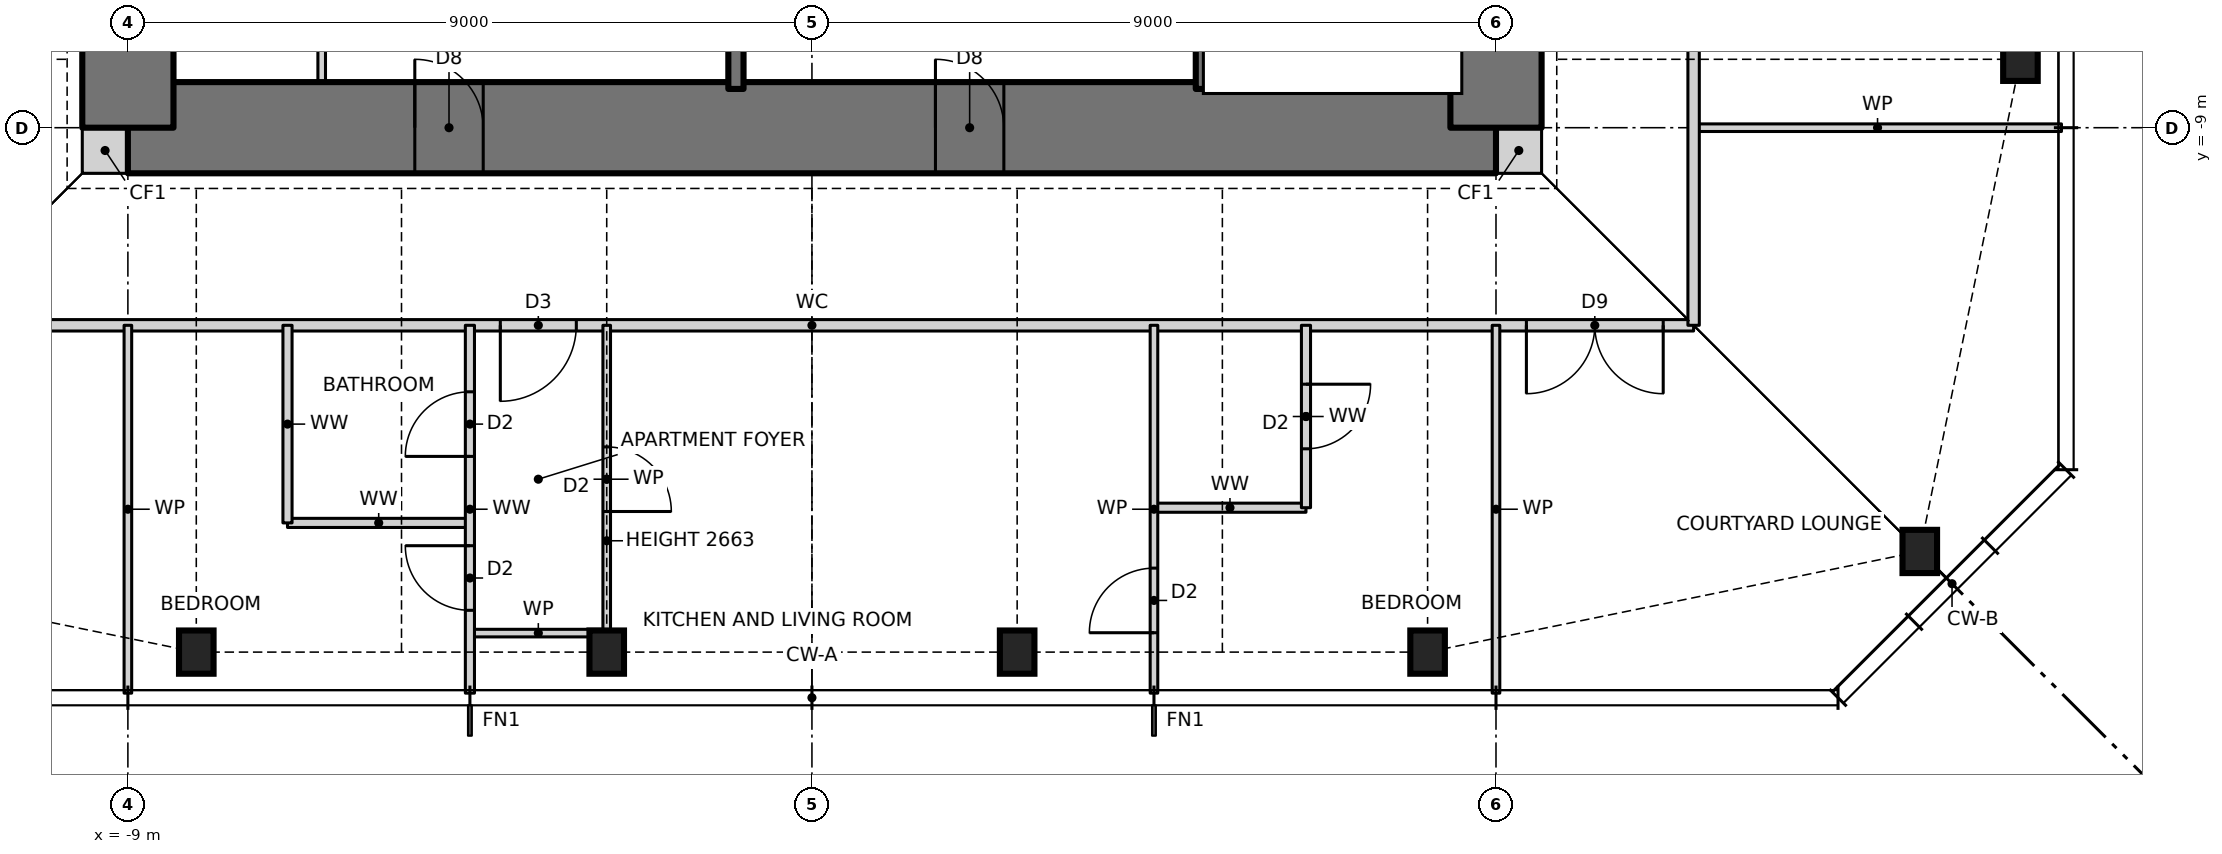
"""IFC4 building model, lengths in metres.
Left out: names, types, materials, properties, quantities, classifications, styles, units other than length and angle.
Written with IfcOpenShell. Run it as: python <this file> out.ifc"""

import sys

from ifc_helpers import new_model, si_unit, direction, frame, frame_2d, origin, origin_2d, place, context, subcontext, project, spatial, rectangle, i_section, extrude, element, fill, save


model = new_model("IFC4")
c1 = context("Model", 3, precision=1e-05, world=origin(), true_north=direction((0.0, 1.0)))
c2 = subcontext(c1, "Body", "Model", "MODEL_VIEW")
j1 = project(units=[si_unit("LENGTHUNIT", "METRE"), si_unit("PLANEANGLEUNIT", "RADIAN")], contexts=[c1])
p1 = place(None, origin())
s1 = spatial("IfcSite", under=j1, at=p1, CompositionType="ELEMENT")
p2 = place(p1, origin())
s2 = spatial("IfcBuilding", under=s1, at=p2, CompositionType="ELEMENT")
p3 = place(p2, frame((0.0, 0.0, 246.5)))
s3 = spatial("IfcBuildingStorey", under=s2, at=p3, CompositionType="ELEMENT", Elevation=246.5)
for number, where, z_axis, x_axis in (
    (1, (-8.1, -15.9, 0.0), (0.0, 0.0, 1.0), (1.0, 0.0, 0.0)),
    (2, (-2.7, -15.9, 0.0), (0.0, 0.0, 1.0), (1.0, 0.0, 0.0)),
    (3, (2.7, -15.9, 0.0), (0.0, 0.0, 1.0), (1.0, 0.0, 0.0)),
    (4, (8.1, -15.9, 0.0), (0.0, 0.0, 1.0), (1.0, 0.0, 0.0)),
    (5, (14.576, -14.576, 0.0), (0.0, 0.0, 1.0), (1.0, 0.0, 0.0)),
    (6, (15.9, -8.1, 0.0), (0.0, 0.0, 1.0), (1.0, 0.0, 0.0)),
):
    element("IfcColumn", number, at=place(p3, frame(where, z_axis=z_axis, x_axis=x_axis)), inside=s3, PredefinedType="COLUMN", context=c2, shape_type="SweptSolid", body=[
        extrude(i_section(OverallWidth=0.455, OverallDepth=0.569, WebThickness=0.078, FlangeThickness=0.125, at=origin_2d()), origin(), (0.0, 0.0, 1.0), 3.5),
    ])
for number, where, z_axis, x_axis in (
    (7, (-9.6, -9.3, 0.0), (0.0, 0.0, 1.0), (1.0, 0.0, 0.0)),
    (8, (9.0, -9.3, 0.0), (0.0, 0.0, 1.0), (1.0, 0.0, 0.0)),
):
    element("IfcWall", number, at=place(p3, frame(where, z_axis=z_axis, x_axis=x_axis)), inside=s3, PredefinedType="SOLIDWALL", context=c2, shape_type="SweptSolid", body=[
        extrude(rectangle(XDim=0.6, YDim=0.6, at=frame_2d((0.3, 0.0))), origin(), (0.0, 0.0, 1.0), 3.5),
    ])
p4 = place(p3, frame((-9.0, -9.0, 0.0), z_axis=(0.0, 0.0, 1.0), x_axis=(1.0, 0.0, 0.0)))
e9 = element("IfcWall", 9, at=p4, inside=s3, PredefinedType="SHEAR", context=c2, shape_type="SweptSolid", body=[
    extrude(rectangle(XDim=18.0, YDim=1.2, at=frame_2d((9.0, 0.0))), origin(), (0.0, 0.0, 1.0), 3.5),
])
p5 = place(p4, frame((3.775, 0.0, 0.0)))
e10 = element("IfcOpeningElement", 10, at=p5, cuts=e9, PredefinedType="OPENING", context=c2, shape_type="SweptSolid", body=[
    extrude(rectangle(XDim=0.9, YDim=2.1, at=frame_2d((0.45, 1.05))), frame((0.0, 0.61, 0.0), z_axis=(0.0, -1.0, 0.0), x_axis=(1.0, 0.0, 0.0)), (0.0, 0.0, 1.0), 1.22),
])
p6 = place(p4, frame((10.625, 0.0, 0.0)))
e11 = element("IfcOpeningElement", 11, at=p6, cuts=e9, PredefinedType="OPENING", context=c2, shape_type="SweptSolid", body=[
    extrude(rectangle(XDim=0.9, YDim=2.1, at=frame_2d((0.45, 1.05))), frame((0.0, 0.61, 0.0), z_axis=(0.0, -1.0, 0.0), x_axis=(1.0, 0.0, 0.0)), (0.0, 0.0, 1.0), 1.22),
])
p7 = place(p3, frame((9.0, -9.0, 0.0), z_axis=(0.0, 0.0, 1.0), x_axis=(0.0, 1.0, 0.0)))
e12 = element("IfcWall", 12, at=p7, inside=s3, PredefinedType="SHEAR", context=c2, shape_type="SweptSolid", body=[
    extrude(rectangle(XDim=18.0, YDim=1.2, at=frame_2d((9.0, 0.0))), origin(), (0.0, 0.0, 1.0), 3.5),
])
p8 = place(p7, frame((8.5, 0.0, 0.0)))
e13 = element("IfcOpeningElement", 13, at=p8, cuts=e12, PredefinedType="OPENING", context=c2, shape_type="SweptSolid", body=[
    extrude(rectangle(XDim=1.0, YDim=2.1, at=frame_2d((0.5, 1.05))), frame((0.0, 0.61, 0.0), z_axis=(0.0, -1.0, 0.0), x_axis=(1.0, 0.0, 0.0)), (0.0, 0.0, 1.0), 1.22),
])
p9 = place(p3, frame((-9.0, 9.0, 0.0), z_axis=(0.0, 0.0, 1.0), x_axis=(0.0, -1.0, 0.0)))
e14 = element("IfcWall", 14, at=p9, inside=s3, PredefinedType="SHEAR", context=c2, shape_type="SweptSolid", body=[
    extrude(rectangle(XDim=18.0, YDim=1.2, at=frame_2d((9.0, 0.0))), origin(), (0.0, 0.0, 1.0), 3.5),
])
p10 = place(p9, frame((8.5, 0.0, 0.0)))
e15 = element("IfcOpeningElement", 15, at=p10, cuts=e14, PredefinedType="OPENING", context=c2, shape_type="SweptSolid", body=[
    extrude(rectangle(XDim=1.0, YDim=2.1, at=frame_2d((0.5, 1.05))), frame((0.0, 0.61, 0.0), z_axis=(0.0, -1.0, 0.0), x_axis=(1.0, 0.0, 0.0)), (0.0, 0.0, 1.0), 1.22),
])
p11 = place(p3, frame((-4.5, -15.65, 0.0), z_axis=(0.0, 0.0, 1.0), x_axis=(1.0, 0.0, 0.0)))
e16 = element("IfcWall", 16, at=p11, inside=s3, PredefinedType="PARTITIONING", context=c2, shape_type="SweptSolid", body=[
    extrude(rectangle(XDim=1.8, YDim=0.1, at=frame_2d((0.9, 0.0))), origin(), (0.0, 0.0, 1.0), 3.27),
])
p12 = place(p3, frame((-6.9, -14.2, 0.0), z_axis=(0.0, 0.0, 1.0), x_axis=(1.0, 0.0, 0.0)))
e17 = element("IfcWall", 17, at=p12, inside=s3, PredefinedType="PARTITIONING", context=c2, shape_type="SweptSolid", body=[
    extrude(rectangle(XDim=2.4, YDim=0.12, at=frame_2d((1.2, 0.0))), origin(), (0.0, 0.0, 1.0), 3.27),
])
p13 = place(p3, frame((4.5, -14.0, 0.0), z_axis=(0.0, 0.0, 1.0), x_axis=(1.0, 0.0, 0.0)))
e18 = element("IfcWall", 18, at=p13, inside=s3, PredefinedType="PARTITIONING", context=c2, shape_type="SweptSolid", body=[
    extrude(rectangle(XDim=2.0, YDim=0.12, at=frame_2d((1.0, 0.0))), origin(), (0.0, 0.0, 1.0), 3.27),
])
p14 = place(p3, frame((-11.6, -11.6, 0.0), z_axis=(0.0, 0.0, 1.0), x_axis=(1.0, 0.0, 0.0)))
e19 = element("IfcWall", 19, at=p14, inside=s3, PredefinedType="PARTITIONING", context=c2, shape_type="SweptSolid", body=[
    extrude(rectangle(XDim=23.2, YDim=0.15, at=frame_2d((11.6, 0.0))), origin(), (0.0, 0.0, 1.0), 3.27),
])
p15 = place(p14, frame((7.5, 0.0, 0.0)))
e20 = element("IfcOpeningElement", 20, at=p15, cuts=e19, PredefinedType="OPENING", context=c2, shape_type="SweptSolid", body=[
    extrude(rectangle(XDim=1.0, YDim=2.1, at=frame_2d((0.5, 1.05))), frame((0.0, 0.085, 0.0), z_axis=(0.0, -1.0, 0.0), x_axis=(1.0, 0.0, 0.0)), (0.0, 0.0, 1.0), 0.17),
])
p16 = place(p14, frame((21.0, 0.0, 0.0)))
e21 = element("IfcOpeningElement", 21, at=p16, cuts=e19, PredefinedType="OPENING", context=c2, shape_type="SweptSolid", body=[
    extrude(rectangle(XDim=1.8, YDim=2.1, at=frame_2d((0.9, 1.05))), frame((0.0, 0.085, 0.0), z_axis=(0.0, -1.0, 0.0), x_axis=(1.0, 0.0, 0.0)), (0.0, 0.0, 1.0), 0.17),
])
p17 = place(p3, frame((11.6, -9.0, 0.0), z_axis=(0.0, 0.0, 1.0), x_axis=(1.0, 0.0, 0.0)))
e22 = element("IfcWall", 22, at=p17, inside=s3, PredefinedType="PARTITIONING", context=c2, shape_type="SweptSolid", body=[
    extrude(rectangle(XDim=4.84, YDim=0.1, at=frame_2d((2.42, 0.0))), origin(), (0.0, 0.0, 1.0), 3.27),
])
p18 = place(p3, frame((11.6, -11.6, 0.0), z_axis=(0.0, 0.0, 1.0), x_axis=(0.0, 1.0, 0.0)))
e23 = element("IfcWall", 23, at=p18, inside=s3, PredefinedType="PARTITIONING", context=c2, shape_type="SweptSolid", body=[
    extrude(rectangle(XDim=23.2, YDim=0.15, at=frame_2d((11.6, 0.0))), origin(), (0.0, 0.0, 1.0), 3.27),
])
p19 = place(p18, frame((7.5, 0.0, 0.0)))
e24 = element("IfcOpeningElement", 24, at=p19, cuts=e23, PredefinedType="OPENING", context=c2, shape_type="SweptSolid", body=[
    extrude(rectangle(XDim=1.0, YDim=2.1, at=frame_2d((0.5, 1.05))), frame((0.0, 0.085, 0.0), z_axis=(0.0, -1.0, 0.0), x_axis=(1.0, 0.0, 0.0)), (0.0, 0.0, 1.0), 0.17),
])
p20 = place(p18, frame((21.0, 0.0, 0.0)))
e25 = element("IfcOpeningElement", 25, at=p20, cuts=e23, PredefinedType="OPENING", context=c2, shape_type="SweptSolid", body=[
    extrude(rectangle(XDim=1.8, YDim=2.1, at=frame_2d((0.9, 1.05))), frame((0.0, 0.085, 0.0), z_axis=(0.0, -1.0, 0.0), x_axis=(1.0, 0.0, 0.0)), (0.0, 0.0, 1.0), 0.17),
])
p21 = place(p3, frame((9.0, -16.44, 0.0), z_axis=(0.0, 0.0, 1.0), x_axis=(0.0, 1.0, 0.0)))
e26 = element("IfcWall", 26, at=p21, inside=s3, PredefinedType="PARTITIONING", context=c2, shape_type="SweptSolid", body=[
    extrude(rectangle(XDim=4.84, YDim=0.1, at=frame_2d((2.42, 0.0))), origin(), (0.0, 0.0, 1.0), 3.27),
])
p22 = place(p3, frame((6.5, -14.0, 0.0), z_axis=(0.0, 0.0, 1.0), x_axis=(0.0, 1.0, 0.0)))
e27 = element("IfcWall", 27, at=p22, inside=s3, PredefinedType="PARTITIONING", context=c2, shape_type="SweptSolid", body=[
    extrude(rectangle(XDim=2.4, YDim=0.12, at=frame_2d((1.2, 0.0))), origin(), (0.0, 0.0, 1.0), 3.27),
])
p23 = place(p22, frame((0.775, 0.0, 0.0)))
e28 = element("IfcOpeningElement", 28, at=p23, cuts=e27, PredefinedType="OPENING", context=c2, shape_type="SweptSolid", body=[
    extrude(rectangle(XDim=0.85, YDim=2.1, at=frame_2d((0.425, 1.05))), frame((0.0, 0.07, 0.0), z_axis=(0.0, -1.0, 0.0), x_axis=(1.0, 0.0, 0.0)), (0.0, 0.0, 1.0), 0.14),
])
p24 = place(p3, frame((5.15, -8.49, 0.0), z_axis=(0.0, 0.0, 1.0), x_axis=(0.0, 1.0, 0.0)))
e29 = element("IfcWall", 29, at=p24, inside=s3, PredefinedType="SOLIDWALL", context=c2, shape_type="SweptSolid", body=[
    extrude(rectangle(XDim=13.09, YDim=0.2, at=frame_2d((6.545, 0.0))), origin(), (0.0, 0.0, 1.0), 3.5),
])
p25 = place(p24, frame((7.89, 0.0, 0.0)))
e30 = element("IfcOpeningElement", 30, at=p25, cuts=e29, PredefinedType="OPENING", context=c2, shape_type="SweptSolid", body=[
    extrude(rectangle(XDim=1.2, YDim=2.1, at=frame_2d((0.6, 1.05))), frame((0.0, 0.11, 0.0), z_axis=(0.0, -1.0, 0.0), x_axis=(1.0, 0.0, 0.0)), (0.0, 0.0, 1.0), 0.22),
])
p26 = place(p3, frame((4.5, -16.44, 0.0), z_axis=(0.0, 0.0, 1.0), x_axis=(0.0, 1.0, 0.0)))
e31 = element("IfcWall", 31, at=p26, inside=s3, PredefinedType="PARTITIONING", context=c2, shape_type="SweptSolid", body=[
    extrude(rectangle(XDim=4.84, YDim=0.1, at=frame_2d((2.42, 0.0))), origin(), (0.0, 0.0, 1.0), 3.27),
])
p27 = place(p26, frame((0.795, 0.0, 0.0)))
e32 = element("IfcOpeningElement", 32, at=p27, cuts=e31, PredefinedType="OPENING", context=c2, shape_type="SweptSolid", body=[
    extrude(rectangle(XDim=0.85, YDim=2.1, at=frame_2d((0.425, 1.05))), frame((0.0, 0.06, 0.0), z_axis=(0.0, -1.0, 0.0), x_axis=(1.0, 0.0, 0.0)), (0.0, 0.0, 1.0), 0.12),
])
p28 = place(p3, frame((-1.0, -8.49, 0.0), z_axis=(0.0, 0.0, 1.0), x_axis=(0.0, 1.0, 0.0)))
e33 = element("IfcWall", 33, at=p28, inside=s3, PredefinedType="SOLIDWALL", context=c2, shape_type="SweptSolid", body=[
    extrude(rectangle(XDim=4.09, YDim=0.2, at=frame_2d((2.045, 0.0))), origin(), (0.0, 0.0, 1.0), 3.5),
])
p29 = place(p3, frame((-2.7, -15.65, 0.0), z_axis=(0.0, 0.0, 1.0), x_axis=(0.0, 1.0, 0.0)))
e34 = element("IfcWall", 34, at=p29, inside=s3, PredefinedType="PARTITIONING", context=c2, shape_type="SweptSolid", body=[
    extrude(rectangle(XDim=4.05, YDim=0.1, at=frame_2d((2.025, 0.0))), origin(), (0.0, 0.0, 1.0), 2.663),
])
p30 = place(p29, frame((1.6, 0.0, 0.0)))
e35 = element("IfcOpeningElement", 35, at=p30, cuts=e34, PredefinedType="OPENING", context=c2, shape_type="SweptSolid", body=[
    extrude(rectangle(XDim=0.85, YDim=2.1, at=frame_2d((0.425, 1.05))), frame((0.0, 0.06, 0.0), z_axis=(0.0, -1.0, 0.0), x_axis=(1.0, 0.0, 0.0)), (0.0, 0.0, 1.0), 0.12),
])
p31 = place(p3, frame((-4.5, -16.44, 0.0), z_axis=(0.0, 0.0, 1.0), x_axis=(0.0, 1.0, 0.0)))
e36 = element("IfcWall", 36, at=p31, inside=s3, PredefinedType="PARTITIONING", context=c2, shape_type="SweptSolid", body=[
    extrude(rectangle(XDim=4.84, YDim=0.12, at=frame_2d((2.42, 0.0))), origin(), (0.0, 0.0, 1.0), 3.27),
])
p32 = place(p31, frame((1.09, 0.0, 0.0)))
e37 = element("IfcOpeningElement", 37, at=p32, cuts=e36, PredefinedType="OPENING", context=c2, shape_type="SweptSolid", body=[
    extrude(rectangle(XDim=0.85, YDim=2.1, at=frame_2d((0.425, 1.05))), frame((0.0, 0.07, 0.0), z_axis=(0.0, -1.0, 0.0), x_axis=(1.0, 0.0, 0.0)), (0.0, 0.0, 1.0), 0.14),
])
p33 = place(p31, frame((3.115, 0.0, 0.0)))
e38 = element("IfcOpeningElement", 38, at=p33, cuts=e36, PredefinedType="OPENING", context=c2, shape_type="SweptSolid", body=[
    extrude(rectangle(XDim=0.85, YDim=2.1, at=frame_2d((0.425, 1.05))), frame((0.0, 0.07, 0.0), z_axis=(0.0, -1.0, 0.0), x_axis=(1.0, 0.0, 0.0)), (0.0, 0.0, 1.0), 0.14),
])
p34 = place(p3, frame((-6.45, -8.49, 0.0), z_axis=(0.0, 0.0, 1.0), x_axis=(0.0, 1.0, 0.0)))
e39 = element("IfcWall", 39, at=p34, inside=s3, PredefinedType="PARTITIONING", context=c2, shape_type="SweptSolid", body=[
    extrude(rectangle(XDim=4.09, YDim=0.1, at=frame_2d((2.045, 0.0))), origin(), (0.0, 0.0, 1.0), 3.3),
])
p35 = place(p34, frame((1.595, 0.0, 0.0)))
e40 = element("IfcOpeningElement", 40, at=p35, cuts=e39, PredefinedType="OPENING", context=c2, shape_type="SweptSolid", body=[
    extrude(rectangle(XDim=0.9, YDim=2.1, at=frame_2d((0.45, 1.05))), frame((0.0, 0.06, 0.0), z_axis=(0.0, -1.0, 0.0), x_axis=(1.0, 0.0, 0.0)), (0.0, 0.0, 1.0), 0.12),
])
p36 = place(p3, frame((-6.9, -14.2, 0.0), z_axis=(0.0, 0.0, 1.0), x_axis=(0.0, 1.0, 0.0)))
e41 = element("IfcWall", 41, at=p36, inside=s3, PredefinedType="PARTITIONING", context=c2, shape_type="SweptSolid", body=[
    extrude(rectangle(XDim=2.6, YDim=0.12, at=frame_2d((1.3, 0.0))), origin(), (0.0, 0.0, 1.0), 3.27),
])
p37 = place(p3, frame((-9.0, -16.44, 0.0), z_axis=(0.0, 0.0, 1.0), x_axis=(0.0, 1.0, 0.0)))
e42 = element("IfcWall", 42, at=p37, inside=s3, PredefinedType="PARTITIONING", context=c2, shape_type="SweptSolid", body=[
    extrude(rectangle(XDim=4.84, YDim=0.1, at=frame_2d((2.42, 0.0))), origin(), (0.0, 0.0, 1.0), 3.27),
])
p38 = place(p15, frame((1.0, 0.0, 0.0), z_axis=(0.0, 0.0, 1.0), x_axis=(-1.0, 0.0, 0.0)))
e43 = element("IfcDoor", 43, at=p38, inside=s3, OperationType="SINGLE_SWING_RIGHT", PredefinedType="DOOR", context=c2, shape_type="SweptSolid", body=[
    extrude(rectangle(XDim=1.0, YDim=2.1, at=frame_2d((0.5, 1.05))), frame((0.0, 0.025, 0.0), z_axis=(0.0, -1.0, 0.0), x_axis=(1.0, 0.0, 0.0)), (0.0, 0.0, 1.0), 0.05),
])
fill(e20, e43)
p39 = place(p30, frame((0.85, 0.0, 0.0), z_axis=(0.0, 0.0, 1.0), x_axis=(-1.0, 0.0, 0.0)))
e44 = element("IfcDoor", 44, at=p39, inside=s3, OperationType="SINGLE_SWING_RIGHT", PredefinedType="DOOR", context=c2, shape_type="SweptSolid", body=[
    extrude(rectangle(XDim=0.85, YDim=2.1, at=frame_2d((0.425, 1.05))), frame((0.0, 0.025, 0.0), z_axis=(0.0, -1.0, 0.0), x_axis=(1.0, 0.0, 0.0)), (0.0, 0.0, 1.0), 0.05),
])
fill(e35, e44)
p40 = place(p32, origin())
e45 = element("IfcDoor", 45, at=p40, inside=s3, OperationType="SINGLE_SWING_RIGHT", PredefinedType="DOOR", context=c2, shape_type="SweptSolid", body=[
    extrude(rectangle(XDim=0.85, YDim=2.1, at=frame_2d((0.425, 1.05))), frame((0.0, 0.025, 0.0), z_axis=(0.0, -1.0, 0.0), x_axis=(1.0, 0.0, 0.0)), (0.0, 0.0, 1.0), 0.05),
])
fill(e37, e45)
p41 = place(p33, origin())
e46 = element("IfcDoor", 46, at=p41, inside=s3, OperationType="SINGLE_SWING_LEFT", PredefinedType="DOOR", context=c2, shape_type="SweptSolid", body=[
    extrude(rectangle(XDim=0.85, YDim=2.1, at=frame_2d((0.425, 1.05))), frame((0.0, 0.025, 0.0), z_axis=(0.0, -1.0, 0.0), x_axis=(1.0, 0.0, 0.0)), (0.0, 0.0, 1.0), 0.05),
])
fill(e38, e46)
p42 = place(p27, origin())
e47 = element("IfcDoor", 47, at=p42, inside=s3, OperationType="SINGLE_SWING_LEFT", PredefinedType="DOOR", context=c2, shape_type="SweptSolid", body=[
    extrude(rectangle(XDim=0.85, YDim=2.1, at=frame_2d((0.425, 1.05))), frame((0.0, 0.025, 0.0), z_axis=(0.0, -1.0, 0.0), x_axis=(1.0, 0.0, 0.0)), (0.0, 0.0, 1.0), 0.05),
])
fill(e32, e47)
p43 = place(p23, frame((0.85, 0.0, 0.0), z_axis=(0.0, 0.0, 1.0), x_axis=(-1.0, 0.0, 0.0)))
e48 = element("IfcDoor", 48, at=p43, inside=s3, OperationType="SINGLE_SWING_LEFT", PredefinedType="DOOR", context=c2, shape_type="SweptSolid", body=[
    extrude(rectangle(XDim=0.85, YDim=2.1, at=frame_2d((0.425, 1.05))), frame((0.0, 0.025, 0.0), z_axis=(0.0, -1.0, 0.0), x_axis=(1.0, 0.0, 0.0)), (0.0, 0.0, 1.0), 0.05),
])
fill(e28, e48)
p44 = place(p16, frame((1.8, 0.0, 0.0), z_axis=(0.0, 0.0, 1.0), x_axis=(-1.0, 0.0, 0.0)))
e49 = element("IfcDoor", 49, at=p44, inside=s3, OperationType="DOUBLE_DOOR_SINGLE_SWING", PredefinedType="DOOR", context=c2, shape_type="SweptSolid", body=[
    extrude(rectangle(XDim=1.8, YDim=2.1, at=frame_2d((0.9, 1.05))), frame((0.0, 0.025, 0.0), z_axis=(0.0, -1.0, 0.0), x_axis=(1.0, 0.0, 0.0)), (0.0, 0.0, 1.0), 0.05),
])
fill(e21, e49)
p45 = place(p5, origin())
e50 = element("IfcDoor", 50, at=p45, inside=s3, OperationType="SINGLE_SWING_LEFT", PredefinedType="DOOR", context=c2, shape_type="SweptSolid", body=[
    extrude(rectangle(XDim=0.9, YDim=2.1, at=frame_2d((0.45, 1.05))), frame((0.0, 0.025, 0.0), z_axis=(0.0, -1.0, 0.0), x_axis=(1.0, 0.0, 0.0)), (0.0, 0.0, 1.0), 0.05),
])
fill(e10, e50)
p46 = place(p6, origin())
e51 = element("IfcDoor", 51, at=p46, inside=s3, OperationType="SINGLE_SWING_LEFT", PredefinedType="DOOR", context=c2, shape_type="SweptSolid", body=[
    extrude(rectangle(XDim=0.9, YDim=2.1, at=frame_2d((0.45, 1.05))), frame((0.0, 0.025, 0.0), z_axis=(0.0, -1.0, 0.0), x_axis=(1.0, 0.0, 0.0)), (0.0, 0.0, 1.0), 0.05),
])
fill(e11, e51)
save(model, sys.argv[1])
